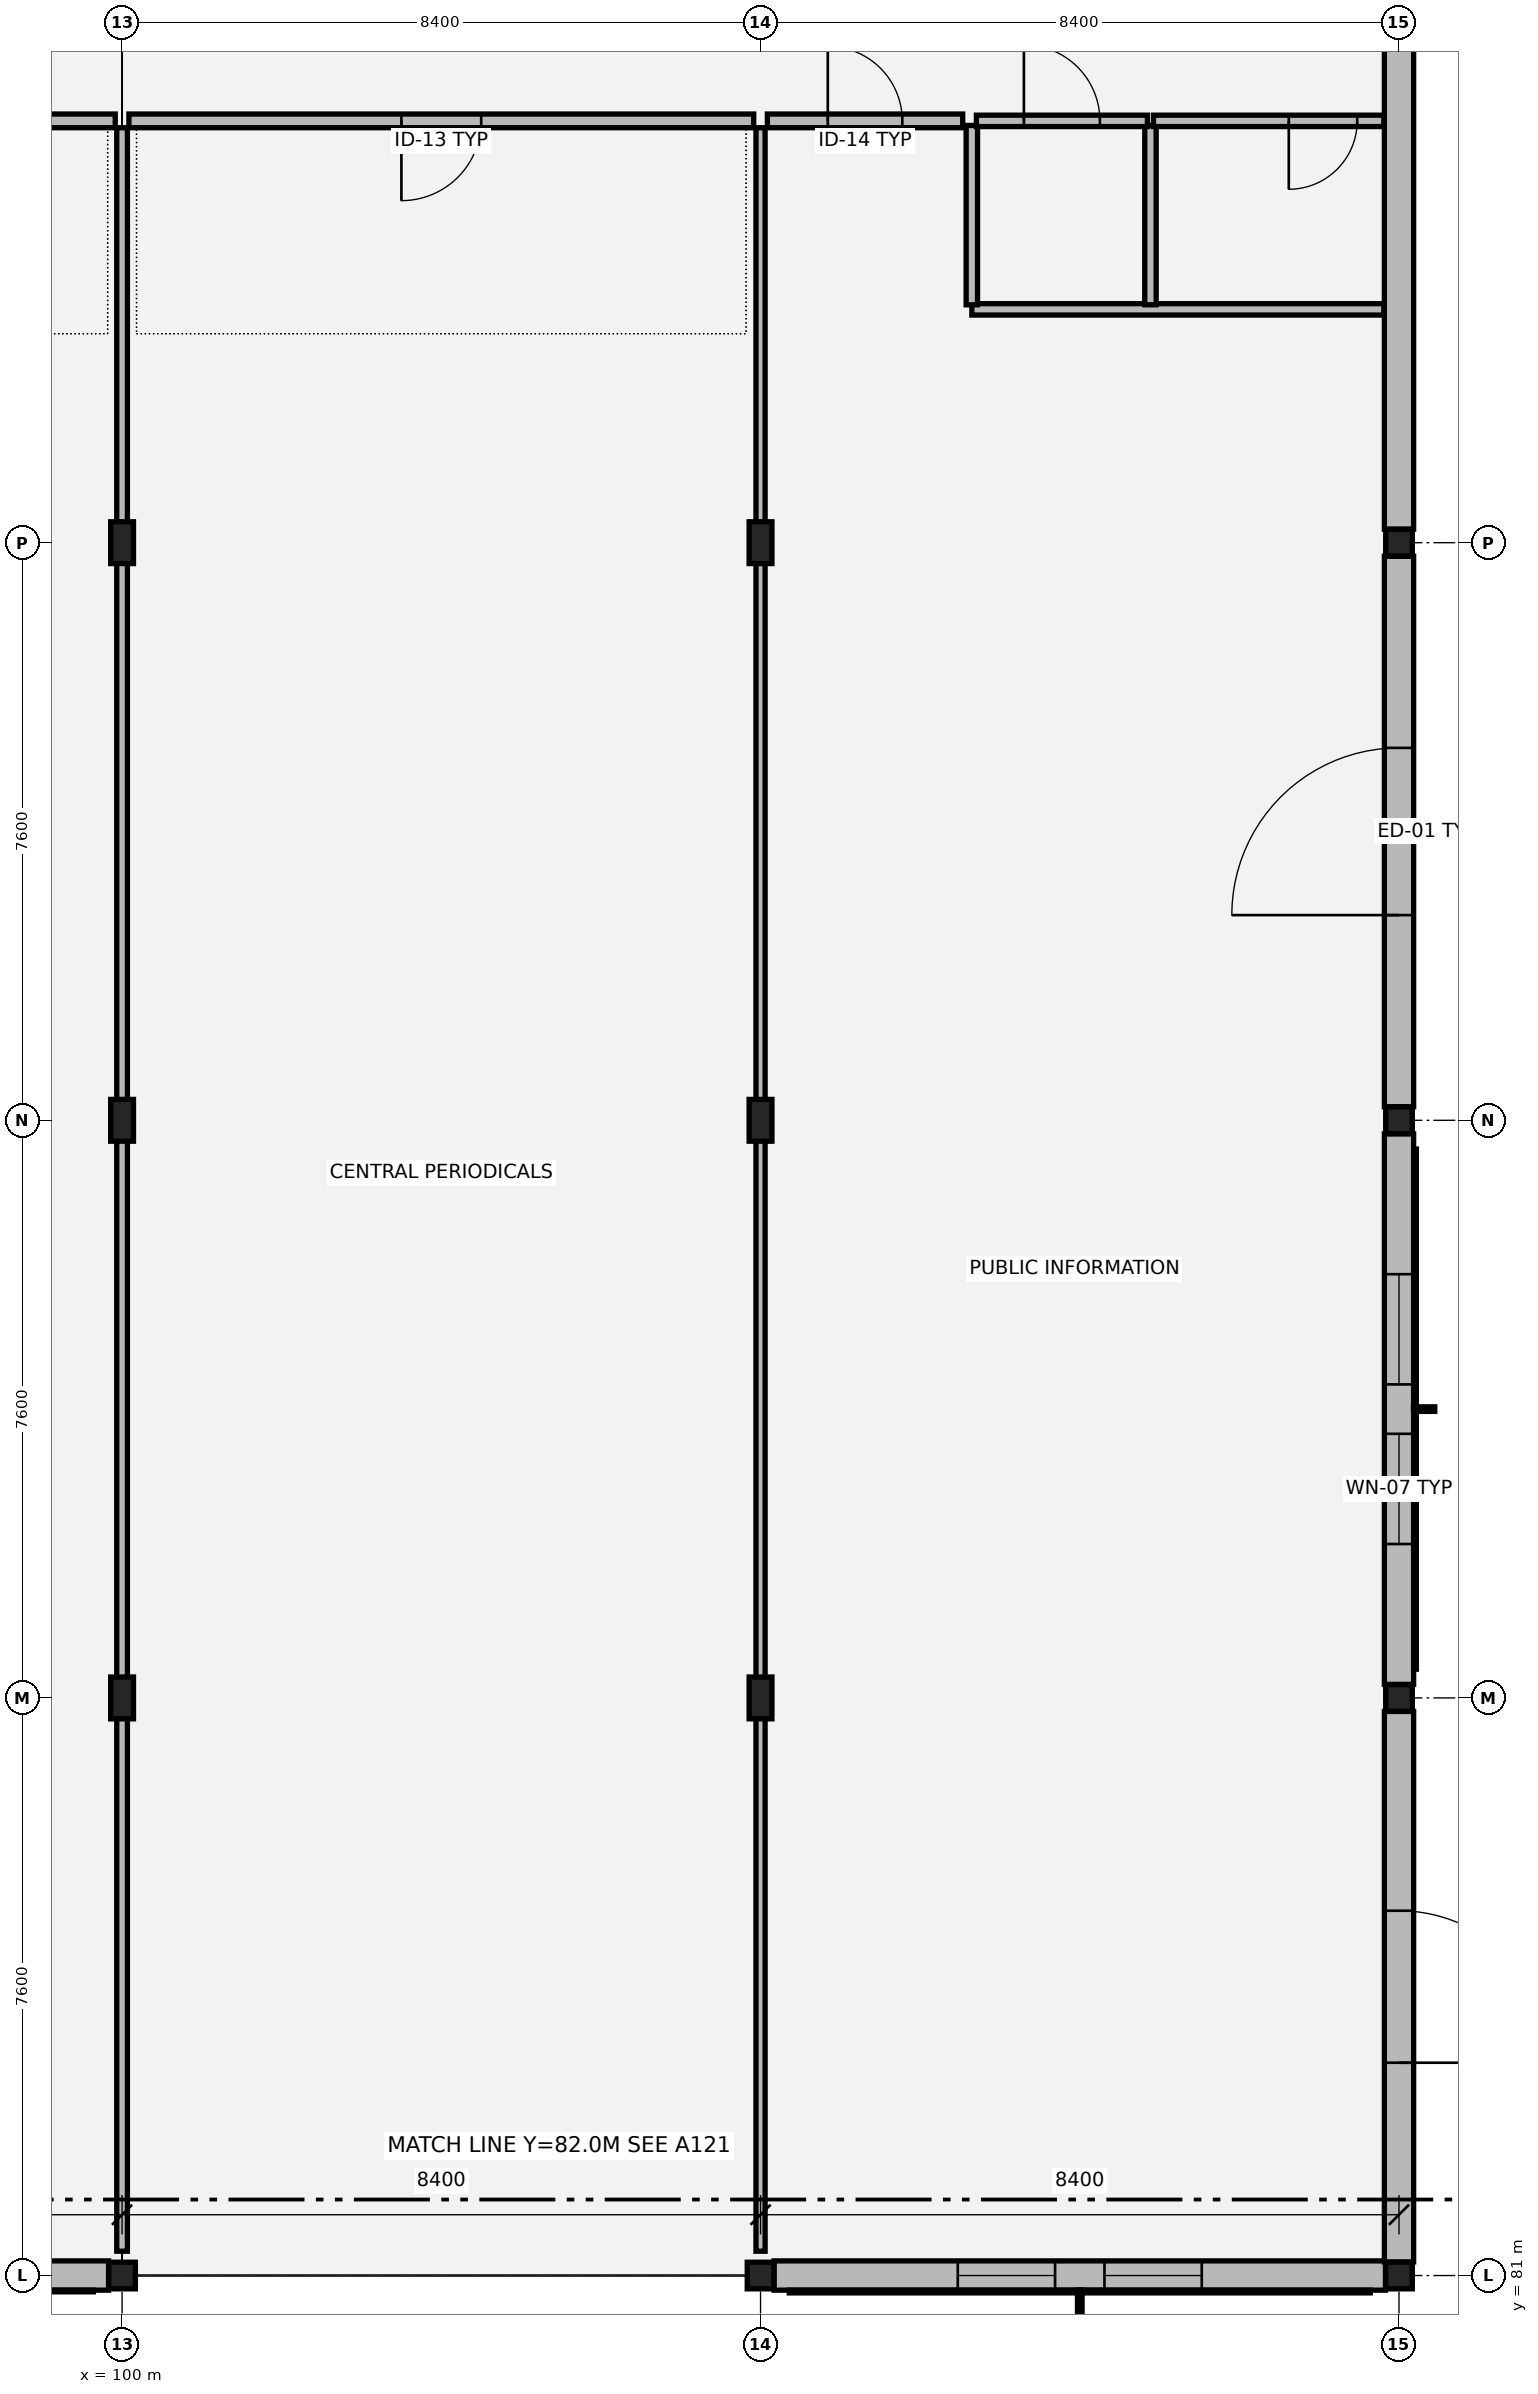
"""IFC4 building model, lengths in metres.
Left out: names, types, materials, properties, quantities, classifications, styles, units other than length and angle.
Written with IfcOpenShell. Run it as: python <this file> out.ifc"""

import sys

from ifc_helpers import new_model, si_unit, direction, frame, frame_2d, origin, origin_2d, place, context, subcontext, project, spatial, rectangle, hollow_rectangle, i_section, extrude, element, fill, save


model = new_model("IFC4")
c1 = context("Model", 3, precision=1e-05, world=origin(), true_north=direction((0.0, 1.0)))
c2 = subcontext(c1, "Body", "Model", "MODEL_VIEW")
j1 = project(units=[si_unit("LENGTHUNIT", "METRE"), si_unit("PLANEANGLEUNIT", "RADIAN")], contexts=[c1])
p1 = place(None, origin())
s1 = spatial("IfcSite", under=j1, at=p1, CompositionType="ELEMENT")
p2 = place(p1, origin())
s2 = spatial("IfcBuilding", under=s1, at=p2, CompositionType="ELEMENT")
p3 = place(p2, origin())
s3 = spatial("IfcBuildingStorey", under=s2, at=p3, CompositionType="ELEMENT", Elevation=0.0)
p4 = place(p3, frame((100.0, 81.0, 0.0), z_axis=(0.0, 0.0, 1.0), x_axis=(1.0, 0.0, 0.0)))
e1 = element("IfcColumn", 1, at=p4, inside=s3, PredefinedType="COLUMN", context=c2, shape_type="SweptSolid", body=[
    extrude(hollow_rectangle(XDim=0.35, YDim=0.35, WallThickness=0.014, at=origin_2d()), origin(), (0.0, 0.0, 1.0), 5.075),
])
for number, where, z_axis, x_axis in (
    (2, (100.0, 88.6, 0.0), (0.0, 0.0, 1.0), (1.0, 0.0, 0.0)),
    (3, (100.0, 96.2, 0.0), (0.0, 0.0, 1.0), (1.0, 0.0, 0.0)),
    (4, (100.0, 103.8, 0.0), (0.0, 0.0, 1.0), (1.0, 0.0, 0.0)),
):
    element("IfcColumn", number, at=place(p3, frame(where, z_axis=z_axis, x_axis=x_axis)), inside=s3, PredefinedType="COLUMN", context=c2, shape_type="SweptSolid", body=[
        extrude(i_section(OverallWidth=0.3, OverallDepth=0.55, WebThickness=0.015, FlangeThickness=0.029, at=origin_2d()), origin(), (0.0, 0.0, 1.0), 5.075),
    ])
p5 = place(p3, frame((108.4, 81.0, 0.0), z_axis=(0.0, 0.0, 1.0), x_axis=(1.0, 0.0, 0.0)))
e5 = element("IfcColumn", 5, at=p5, inside=s3, PredefinedType="COLUMN", context=c2, shape_type="SweptSolid", body=[
    extrude(hollow_rectangle(XDim=0.35, YDim=0.35, WallThickness=0.014, at=origin_2d()), origin(), (0.0, 0.0, 1.0), 5.075),
])
for number, where, z_axis, x_axis in (
    (6, (108.4, 88.6, 0.0), (0.0, 0.0, 1.0), (1.0, 0.0, 0.0)),
    (7, (108.4, 96.2, 0.0), (0.0, 0.0, 1.0), (1.0, 0.0, 0.0)),
    (8, (108.4, 103.8, 0.0), (0.0, 0.0, 1.0), (1.0, 0.0, 0.0)),
):
    element("IfcColumn", number, at=place(p3, frame(where, z_axis=z_axis, x_axis=x_axis)), inside=s3, PredefinedType="COLUMN", context=c2, shape_type="SweptSolid", body=[
        extrude(i_section(OverallWidth=0.3, OverallDepth=0.55, WebThickness=0.015, FlangeThickness=0.029, at=origin_2d()), origin(), (0.0, 0.0, 1.0), 5.075),
    ])
for number, where, z_axis, x_axis in (
    (9, (116.8, 81.0, 0.0), (0.0, 0.0, 1.0), (1.0, 0.0, 0.0)),
    (10, (116.8, 88.6, 0.0), (0.0, 0.0, 1.0), (1.0, 0.0, 0.0)),
    (11, (116.8, 96.2, 0.0), (0.0, 0.0, 1.0), (1.0, 0.0, 0.0)),
    (12, (116.8, 103.8, 0.0), (0.0, 0.0, 1.0), (1.0, 0.0, 0.0)),
):
    element("IfcColumn", number, at=place(p3, frame(where, z_axis=z_axis, x_axis=x_axis)), inside=s3, PredefinedType="COLUMN", context=c2, shape_type="SweptSolid", body=[
        extrude(hollow_rectangle(XDim=0.35, YDim=0.35, WallThickness=0.014, at=origin_2d()), origin(), (0.0, 0.0, 1.0), 5.075),
    ])
p6 = place(p3, frame((91.778, 81.0, 0.0), z_axis=(0.0, 0.0, 1.0), x_axis=(1.0, 0.0, 0.0)))
e13 = element("IfcWall", 13, at=p6, inside=s3, PredefinedType="SOLIDWALL", context=c2, shape_type="SweptSolid", body=[
    extrude(rectangle(XDim=8.044, YDim=0.385, at=frame_2d((4.022, 0.0))), origin(), (0.0, 0.0, 1.0), 4.5),
])
p7 = place(p6, frame((2.047, 0.0, 0.8)))
e14 = element("IfcOpeningElement", 14, at=p7, cuts=e13, PredefinedType="OPENING", context=c2, shape_type="SweptSolid", body=[
    extrude(rectangle(XDim=1.65, YDim=2.25, at=frame_2d((0.825, 1.125))), frame((0.0, 0.202, 0.0), z_axis=(0.0, -1.0, 0.0), x_axis=(1.0, 0.0, 0.0)), (0.0, 0.0, 1.0), 0.405),
])
p8 = place(p6, frame((4.347, 0.0, 0.8)))
e15 = element("IfcOpeningElement", 15, at=p8, cuts=e13, PredefinedType="OPENING", context=c2, shape_type="SweptSolid", body=[
    extrude(rectangle(XDim=1.65, YDim=2.25, at=frame_2d((0.825, 1.125))), frame((0.0, 0.202, 0.0), z_axis=(0.0, -1.0, 0.0), x_axis=(1.0, 0.0, 0.0)), (0.0, 0.0, 1.0), 0.405),
])
p9 = place(p3, frame((108.578, 81.0, 0.0), z_axis=(0.0, 0.0, 1.0), x_axis=(1.0, 0.0, 0.0)))
e16 = element("IfcWall", 16, at=p9, inside=s3, PredefinedType="SOLIDWALL", context=c2, shape_type="SweptSolid", body=[
    extrude(rectangle(XDim=8.044, YDim=0.385, at=frame_2d((4.022, 0.0))), origin(), (0.0, 0.0, 1.0), 4.5),
])
p10 = place(p9, frame((2.417, 0.0, 0.8)))
e17 = element("IfcOpeningElement", 17, at=p10, cuts=e16, PredefinedType="OPENING", context=c2, shape_type="SweptSolid", body=[
    extrude(rectangle(XDim=1.28, YDim=2.08, at=frame_2d((0.64, 1.04))), frame((0.0, 0.202, 0.0), z_axis=(0.0, -1.0, 0.0), x_axis=(1.0, 0.0, 0.0)), (0.0, 0.0, 1.0), 0.405),
])
p11 = place(p9, frame((4.347, 0.0, 0.8)))
e18 = element("IfcOpeningElement", 18, at=p11, cuts=e16, PredefinedType="OPENING", context=c2, shape_type="SweptSolid", body=[
    extrude(rectangle(XDim=1.28, YDim=2.08, at=frame_2d((0.64, 1.04))), frame((0.0, 0.202, 0.0), z_axis=(0.0, -1.0, 0.0), x_axis=(1.0, 0.0, 0.0)), (0.0, 0.0, 1.0), 0.405),
])
p12 = place(p3, frame((116.8, 81.178, 0.0), z_axis=(0.0, 0.0, 1.0), x_axis=(0.0, 1.0, 0.0)))
e19 = element("IfcWall", 19, at=p12, inside=s3, PredefinedType="SOLIDWALL", context=c2, shape_type="SweptSolid", body=[
    extrude(rectangle(XDim=7.244, YDim=0.385, at=frame_2d((3.622, 0.0))), origin(), (0.0, 0.0, 1.0), 4.5),
])
p13 = place(p12, frame((2.622, 0.0, 0.0)))
e20 = element("IfcOpeningElement", 20, at=p13, cuts=e19, PredefinedType="OPENING", context=c2, shape_type="SweptSolid", body=[
    extrude(rectangle(XDim=2.0, YDim=2.45, at=frame_2d((1.0, 1.225))), frame((0.0, 0.202, 0.0), z_axis=(0.0, -1.0, 0.0), x_axis=(1.0, 0.0, 0.0)), (0.0, 0.0, 1.0), 0.405),
])
p14 = place(p3, frame((116.8, 88.778, 0.0), z_axis=(0.0, 0.0, 1.0), x_axis=(0.0, 1.0, 0.0)))
e21 = element("IfcWall", 21, at=p14, inside=s3, PredefinedType="SOLIDWALL", context=c2, shape_type="SweptSolid", body=[
    extrude(rectangle(XDim=7.244, YDim=0.385, at=frame_2d((3.622, 0.0))), origin(), (0.0, 0.0, 1.0), 4.5),
])
p15 = place(p14, frame((1.847, 0.0, 0.8)))
e22 = element("IfcOpeningElement", 22, at=p15, cuts=e21, PredefinedType="OPENING", context=c2, shape_type="SweptSolid", body=[
    extrude(rectangle(XDim=1.45, YDim=2.2, at=frame_2d((0.725, 1.1))), frame((0.0, 0.202, 0.0), z_axis=(0.0, -1.0, 0.0), x_axis=(1.0, 0.0, 0.0)), (0.0, 0.0, 1.0), 0.405),
])
p16 = place(p14, frame((3.947, 0.0, 0.8)))
e23 = element("IfcOpeningElement", 23, at=p16, cuts=e21, PredefinedType="OPENING", context=c2, shape_type="SweptSolid", body=[
    extrude(rectangle(XDim=1.45, YDim=2.2, at=frame_2d((0.725, 1.1))), frame((0.0, 0.202, 0.0), z_axis=(0.0, -1.0, 0.0), x_axis=(1.0, 0.0, 0.0)), (0.0, 0.0, 1.0), 0.405),
])
p17 = place(p3, frame((116.8, 96.378, 0.0), z_axis=(0.0, 0.0, 1.0), x_axis=(0.0, 1.0, 0.0)))
e24 = element("IfcWall", 24, at=p17, inside=s3, PredefinedType="SOLIDWALL", context=c2, shape_type="SweptSolid", body=[
    extrude(rectangle(XDim=7.244, YDim=0.385, at=frame_2d((3.622, 0.0))), origin(), (0.0, 0.0, 1.0), 4.5),
])
p18 = place(p17, frame((2.522, 0.0, 0.0)))
e25 = element("IfcOpeningElement", 25, at=p18, cuts=e24, PredefinedType="OPENING", context=c2, shape_type="SweptSolid", body=[
    extrude(rectangle(XDim=2.2, YDim=2.5, at=frame_2d((1.1, 1.25))), frame((0.0, 0.202, 0.0), z_axis=(0.0, -1.0, 0.0), x_axis=(1.0, 0.0, 0.0)), (0.0, 0.0, 1.0), 0.405),
])
p19 = place(p3, frame((116.8, 103.978, 0.0), z_axis=(0.0, 0.0, 1.0), x_axis=(0.0, 1.0, 0.0)))
e26 = element("IfcWall", 26, at=p19, inside=s3, PredefinedType="SOLIDWALL", context=c2, shape_type="SweptSolid", body=[
    extrude(rectangle(XDim=7.244, YDim=0.385, at=frame_2d((3.622, 0.0))), origin(), (0.0, 0.0, 1.0), 4.5),
])
p20 = place(p3, frame((111.18, 106.87, 0.0), z_axis=(0.0, 0.0, 1.0), x_axis=(1.0, 0.0, 0.0)))
e27 = element("IfcWall", 27, at=p20, inside=s3, PredefinedType="PARTITIONING", context=c2, shape_type="SweptSolid", body=[
    extrude(rectangle(XDim=5.42, YDim=0.15, at=frame_2d((2.71, 0.0))), origin(), (0.0, 0.0, 1.0), 4.2),
])
for number, where, z_axis, x_axis in (
    (28, (111.18, 106.93, 0.0), (0.0, 0.0, 1.0), (0.0, 1.0, 0.0)),
    (29, (113.53, 106.93, 0.0), (0.0, 0.0, 1.0), (0.0, 1.0, 0.0)),
):
    element("IfcWall", number, at=place(p3, frame(where, z_axis=z_axis, x_axis=x_axis)), inside=s3, PredefinedType="PARTITIONING", context=c2, shape_type="SweptSolid", body=[
        extrude(rectangle(XDim=2.36, YDim=0.15, at=frame_2d((1.18, 0.0))), origin(), (0.0, 0.0, 1.0), 4.2),
    ])
p21 = place(p3, frame((111.24, 109.35, 0.0), z_axis=(0.0, 0.0, 1.0), x_axis=(1.0, 0.0, 0.0)))
e30 = element("IfcWall", 30, at=p21, inside=s3, PredefinedType="PARTITIONING", context=c2, shape_type="SweptSolid", body=[
    extrude(rectangle(XDim=2.25, YDim=0.15, at=frame_2d((1.125, 0.0))), origin(), (0.0, 0.0, 1.0), 4.2),
])
p22 = place(p21, frame((0.625, 0.0, 0.0)))
e31 = element("IfcOpeningElement", 31, at=p22, cuts=e30, PredefinedType="OPENING", context=c2, shape_type="SweptSolid", body=[
    extrude(rectangle(XDim=1.0, YDim=2.15, at=frame_2d((0.5, 1.075))), frame((0.0, 0.085, 0.0), z_axis=(0.0, -1.0, 0.0), x_axis=(1.0, 0.0, 0.0)), (0.0, 0.0, 1.0), 0.17),
])
p23 = place(p3, frame((113.57, 109.35, 0.0), z_axis=(0.0, 0.0, 1.0), x_axis=(1.0, 0.0, 0.0)))
e32 = element("IfcWall", 32, at=p23, inside=s3, PredefinedType="PARTITIONING", context=c2, shape_type="SweptSolid", body=[
    extrude(rectangle(XDim=3.03, YDim=0.15, at=frame_2d((1.515, 0.0))), origin(), (0.0, 0.0, 1.0), 4.2),
])
p24 = place(p23, frame((1.78, 0.0, 0.0)))
e33 = element("IfcOpeningElement", 33, at=p24, cuts=e32, PredefinedType="OPENING", context=c2, shape_type="SweptSolid", body=[
    extrude(rectangle(XDim=0.9, YDim=2.15, at=frame_2d((0.45, 1.075))), frame((0.0, 0.085, 0.0), z_axis=(0.0, -1.0, 0.0), x_axis=(1.0, 0.0, 0.0)), (0.0, 0.0, 1.0), 0.17),
])
p25 = place(p3, frame((83.29, 109.35, 0.0), z_axis=(0.0, 0.0, 1.0), x_axis=(1.0, 0.0, 0.0)))
e34 = element("IfcWall", 34, at=p25, inside=s3, PredefinedType="PARTITIONING", context=c2, shape_type="SweptSolid", body=[
    extrude(rectangle(XDim=16.62, YDim=0.18, at=frame_2d((8.31, 0.0))), origin(), (0.0, 0.0, 1.0), 4.2),
])
p26 = place(p25, frame((7.63, 0.0, 0.0)))
e35 = element("IfcOpeningElement", 35, at=p26, cuts=e34, PredefinedType="OPENING", context=c2, shape_type="SweptSolid", body=[
    extrude(rectangle(XDim=1.36, YDim=2.2, at=frame_2d((0.68, 1.1))), frame((0.0, 0.1, 0.0), z_axis=(0.0, -1.0, 0.0), x_axis=(1.0, 0.0, 0.0)), (0.0, 0.0, 1.0), 0.2),
])
p27 = place(p3, frame((100.09, 109.35, 0.0), z_axis=(0.0, 0.0, 1.0), x_axis=(1.0, 0.0, 0.0)))
e36 = element("IfcWall", 36, at=p27, inside=s3, PredefinedType="PARTITIONING", context=c2, shape_type="SweptSolid", body=[
    extrude(rectangle(XDim=8.22, YDim=0.18, at=frame_2d((4.11, 0.0))), origin(), (0.0, 0.0, 1.0), 4.2),
])
p28 = place(p27, frame((3.585, 0.0, 0.0)))
e37 = element("IfcOpeningElement", 37, at=p28, cuts=e36, PredefinedType="OPENING", context=c2, shape_type="SweptSolid", body=[
    extrude(rectangle(XDim=1.05, YDim=2.15, at=frame_2d((0.525, 1.075))), frame((0.0, 0.1, 0.0), z_axis=(0.0, -1.0, 0.0), x_axis=(1.0, 0.0, 0.0)), (0.0, 0.0, 1.0), 0.2),
])
p29 = place(p3, frame((108.49, 109.35, 0.0), z_axis=(0.0, 0.0, 1.0), x_axis=(1.0, 0.0, 0.0)))
e38 = element("IfcWall", 38, at=p29, inside=s3, PredefinedType="PARTITIONING", context=c2, shape_type="SweptSolid", body=[
    extrude(rectangle(XDim=2.57, YDim=0.18, at=frame_2d((1.285, 0.0))), origin(), (0.0, 0.0, 1.0), 4.2),
])
p30 = place(p29, frame((0.795, 0.0, 0.0)))
e39 = element("IfcOpeningElement", 39, at=p30, cuts=e38, PredefinedType="OPENING", context=c2, shape_type="SweptSolid", body=[
    extrude(rectangle(XDim=0.98, YDim=2.15, at=frame_2d((0.49, 1.075))), frame((0.0, 0.1, 0.0), z_axis=(0.0, -1.0, 0.0), x_axis=(1.0, 0.0, 0.0)), (0.0, 0.0, 1.0), 0.2),
])
p31 = place(p3, frame((100.0, 81.32, 0.0), z_axis=(0.0, 0.0, 1.0), x_axis=(0.0, 1.0, 0.0)))
e40 = element("IfcWall", 40, at=p31, inside=s3, PredefinedType="PARTITIONING", context=c2, shape_type="SweptSolid", body=[
    extrude(rectangle(XDim=27.94, YDim=0.14, at=frame_2d((13.97, 0.0))), origin(), (0.0, 0.0, 1.0), 4.2),
])
p32 = place(p3, frame((108.4, 81.32, 0.0), z_axis=(0.0, 0.0, 1.0), x_axis=(0.0, 1.0, 0.0)))
e41 = element("IfcWall", 41, at=p32, inside=s3, PredefinedType="PARTITIONING", context=c2, shape_type="SweptSolid", body=[
    extrude(rectangle(XDim=27.94, YDim=0.12, at=frame_2d((13.97, 0.0))), origin(), (0.0, 0.0, 1.0), 4.2),
])
p33 = place(p10, origin())
e42 = element("IfcWindow", 42, at=p33, inside=s3, PartitioningType="SINGLE_PANEL", PredefinedType="WINDOW", context=c2, shape_type="SweptSolid", body=[
    extrude(rectangle(XDim=1.28, YDim=2.08, at=frame_2d((0.64, 1.04))), frame((0.0, 0.03, 0.0), z_axis=(0.0, -1.0, 0.0), x_axis=(1.0, 0.0, 0.0)), (0.0, 0.0, 1.0), 0.06),
])
fill(e17, e42)
p34 = place(p11, origin())
e43 = element("IfcWindow", 43, at=p34, inside=s3, PartitioningType="SINGLE_PANEL", PredefinedType="WINDOW", context=c2, shape_type="SweptSolid", body=[
    extrude(rectangle(XDim=1.28, YDim=2.08, at=frame_2d((0.64, 1.04))), frame((0.0, 0.03, 0.0), z_axis=(0.0, -1.0, 0.0), x_axis=(1.0, 0.0, 0.0)), (0.0, 0.0, 1.0), 0.06),
])
fill(e18, e43)
p35 = place(p13, origin())
e44 = element("IfcDoor", 44, at=p35, inside=s3, OperationType="SINGLE_SWING_RIGHT", PredefinedType="DOOR", context=c2, shape_type="SweptSolid", body=[
    extrude(rectangle(XDim=2.0, YDim=2.45, at=frame_2d((1.0, 1.225))), frame((0.0, 0.025, 0.0), z_axis=(0.0, -1.0, 0.0), x_axis=(1.0, 0.0, 0.0)), (0.0, 0.0, 1.0), 0.05),
])
fill(e20, e44)
p36 = place(p15, origin())
e45 = element("IfcWindow", 45, at=p36, inside=s3, PartitioningType="SINGLE_PANEL", PredefinedType="WINDOW", context=c2, shape_type="SweptSolid", body=[
    extrude(rectangle(XDim=1.45, YDim=2.2, at=frame_2d((0.725, 1.1))), frame((0.0, 0.03, 0.0), z_axis=(0.0, -1.0, 0.0), x_axis=(1.0, 0.0, 0.0)), (0.0, 0.0, 1.0), 0.06),
])
fill(e22, e45)
p37 = place(p16, origin())
e46 = element("IfcWindow", 46, at=p37, inside=s3, PartitioningType="SINGLE_PANEL", PredefinedType="WINDOW", context=c2, shape_type="SweptSolid", body=[
    extrude(rectangle(XDim=1.45, YDim=2.2, at=frame_2d((0.725, 1.1))), frame((0.0, 0.03, 0.0), z_axis=(0.0, -1.0, 0.0), x_axis=(1.0, 0.0, 0.0)), (0.0, 0.0, 1.0), 0.06),
])
fill(e23, e46)
p38 = place(p18, origin())
e47 = element("IfcDoor", 47, at=p38, inside=s3, OperationType="SINGLE_SWING_LEFT", PredefinedType="DOOR", context=c2, shape_type="SweptSolid", body=[
    extrude(rectangle(XDim=2.2, YDim=2.5, at=frame_2d((1.1, 1.25))), frame((0.0, 0.025, 0.0), z_axis=(0.0, -1.0, 0.0), x_axis=(1.0, 0.0, 0.0)), (0.0, 0.0, 1.0), 0.05),
])
fill(e25, e47)
p39 = place(p22, origin())
e48 = element("IfcDoor", 48, at=p39, inside=s3, OperationType="SINGLE_SWING_LEFT", PredefinedType="DOOR", context=c2, shape_type="SweptSolid", body=[
    extrude(rectangle(XDim=1.0, YDim=2.15, at=frame_2d((0.5, 1.075))), frame((0.0, 0.025, 0.0), z_axis=(0.0, -1.0, 0.0), x_axis=(1.0, 0.0, 0.0)), (0.0, 0.0, 1.0), 0.05),
])
fill(e31, e48)
p40 = place(p24, origin())
e49 = element("IfcDoor", 49, at=p40, inside=s3, OperationType="SINGLE_SWING_RIGHT", PredefinedType="DOOR", context=c2, shape_type="SweptSolid", body=[
    extrude(rectangle(XDim=0.9, YDim=2.15, at=frame_2d((0.45, 1.075))), frame((0.0, 0.025, 0.0), z_axis=(0.0, -1.0, 0.0), x_axis=(1.0, 0.0, 0.0)), (0.0, 0.0, 1.0), 0.05),
])
fill(e33, e49)
p41 = place(p28, origin())
e50 = element("IfcDoor", 50, at=p41, inside=s3, OperationType="SINGLE_SWING_RIGHT", PredefinedType="DOOR", context=c2, shape_type="SweptSolid", body=[
    extrude(rectangle(XDim=1.05, YDim=2.15, at=frame_2d((0.525, 1.075))), frame((0.0, 0.025, 0.0), z_axis=(0.0, -1.0, 0.0), x_axis=(1.0, 0.0, 0.0)), (0.0, 0.0, 1.0), 0.05),
])
fill(e37, e50)
p42 = place(p30, origin())
e51 = element("IfcDoor", 51, at=p42, inside=s3, OperationType="SINGLE_SWING_LEFT", PredefinedType="DOOR", context=c2, shape_type="SweptSolid", body=[
    extrude(rectangle(XDim=0.98, YDim=2.15, at=frame_2d((0.49, 1.075))), frame((0.0, 0.025, 0.0), z_axis=(0.0, -1.0, 0.0), x_axis=(1.0, 0.0, 0.0)), (0.0, 0.0, 1.0), 0.05),
])
fill(e39, e51)
save(model, sys.argv[1])
